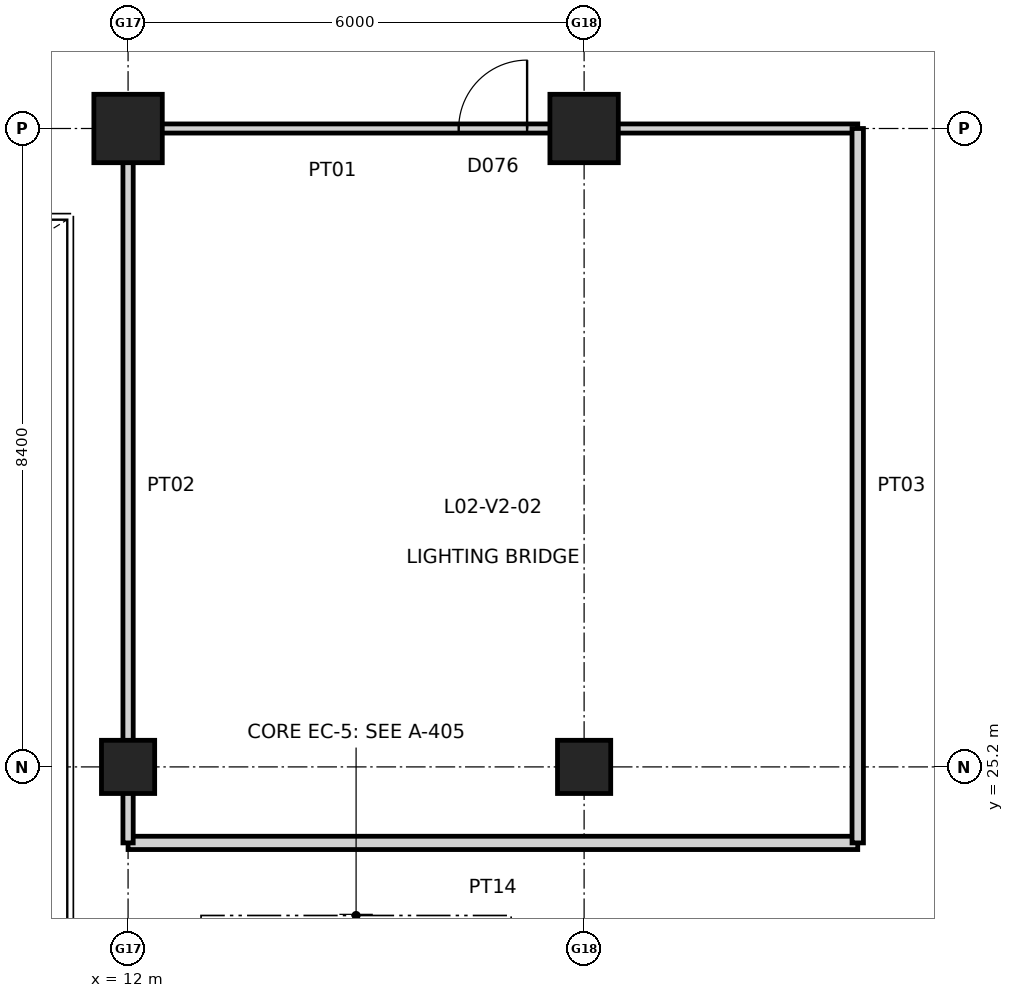
"""IFC4 building model, lengths in metres.
Left out: names, types, materials, properties, quantities, classifications, styles, units other than length and angle.
Written with IfcOpenShell. Run it as: python <this file> out.ifc"""

import sys

from ifc_helpers import new_model, si_unit, direction, frame, frame_2d, origin, origin_2d, place, context, subcontext, project, spatial, rectangle, extrude, element, fill, save


model = new_model("IFC4")
c1 = context("Model", 3, precision=1e-05, world=origin(), true_north=direction((0.0, 1.0)))
c2 = subcontext(c1, "Body", "Model", "MODEL_VIEW")
j1 = project(units=[si_unit("LENGTHUNIT", "METRE"), si_unit("PLANEANGLEUNIT", "RADIAN")], contexts=[c1])
p1 = place(None, origin())
s1 = spatial("IfcSite", under=j1, at=p1, CompositionType="ELEMENT")
p2 = place(p1, origin())
s2 = spatial("IfcBuilding", under=s1, at=p2, CompositionType="ELEMENT")
p3 = place(p2, frame((0.0, 0.0, 10.2)))
s3 = spatial("IfcBuildingStorey", under=s2, at=p3, CompositionType="ELEMENT", Elevation=10.2)
p4 = place(p3, frame((12.0, 25.2, 0.0), z_axis=(0.0, 0.0, 1.0), x_axis=(1.0, 0.0, 0.0)))
e1 = element("IfcColumn", 1, at=p4, inside=s3, PredefinedType="COLUMN", context=c2, shape_type="SweptSolid", body=[
    extrude(rectangle(XDim=0.7, YDim=0.7, at=origin_2d()), origin(), (0.0, 0.0, 1.0), 4.8),
])
p5 = place(p3, frame((12.0, 33.6, 0.0), z_axis=(0.0, 0.0, 1.0), x_axis=(1.0, 0.0, 0.0)))
e2 = element("IfcColumn", 2, at=p5, inside=s3, PredefinedType="COLUMN", context=c2, shape_type="SweptSolid", body=[
    extrude(rectangle(XDim=0.9, YDim=0.9, at=origin_2d()), origin(), (0.0, 0.0, 1.0), 4.8),
])
p6 = place(p3, frame((18.0, 25.2, 0.0), z_axis=(0.0, 0.0, 1.0), x_axis=(1.0, 0.0, 0.0)))
e3 = element("IfcColumn", 3, at=p6, inside=s3, PredefinedType="COLUMN", context=c2, shape_type="SweptSolid", body=[
    extrude(rectangle(XDim=0.7, YDim=0.7, at=origin_2d()), origin(), (0.0, 0.0, 1.0), 4.8),
])
p7 = place(p3, frame((18.0, 33.6, 0.0), z_axis=(0.0, 0.0, 1.0), x_axis=(1.0, 0.0, 0.0)))
e4 = element("IfcColumn", 4, at=p7, inside=s3, PredefinedType="COLUMN", context=c2, shape_type="SweptSolid", body=[
    extrude(rectangle(XDim=0.9, YDim=0.9, at=origin_2d()), origin(), (0.0, 0.0, 1.0), 4.8),
])
p8 = place(p3, frame((12.0, 24.2, 0.0), z_axis=(0.0, 0.0, 1.0), x_axis=(1.0, 0.0, 0.0)))
e5 = element("IfcWall", 5, at=p8, inside=s3, PredefinedType="PARTITIONING", context=c2, shape_type="SweptSolid", body=[
    extrude(rectangle(XDim=9.6, YDim=0.175, at=frame_2d((4.8, 0.0))), origin(), (0.0, 0.0, 1.0), 4.42),
])
p9 = place(p3, frame((12.0, 33.6, 0.0), z_axis=(0.0, 0.0, 1.0), x_axis=(1.0, 0.0, 0.0)))
e6 = element("IfcWall", 6, at=p9, inside=s3, PredefinedType="PARTITIONING", context=c2, shape_type="SweptSolid", body=[
    extrude(rectangle(XDim=9.6, YDim=0.12, at=frame_2d((4.8, 0.0))), origin(), (0.0, 0.0, 1.0), 3.812),
])
p10 = place(p9, frame((4.35, 0.0, 0.0)))
e7 = element("IfcOpeningElement", 7, at=p10, cuts=e6, PredefinedType="OPENING", context=c2, shape_type="SweptSolid", body=[
    extrude(rectangle(XDim=0.9, YDim=2.1, at=frame_2d((0.45, 1.05))), frame((0.0, 0.07, 0.0), z_axis=(0.0, -1.0, 0.0), x_axis=(1.0, 0.0, 0.0)), (0.0, 0.0, 1.0), 0.14),
])
p11 = place(p3, frame((12.0, 24.2, 0.0), z_axis=(0.0, 0.0, 1.0), x_axis=(0.0, 1.0, 0.0)))
e8 = element("IfcWall", 8, at=p11, inside=s3, PredefinedType="PARTITIONING", context=c2, shape_type="SweptSolid", body=[
    extrude(rectangle(XDim=9.4, YDim=0.135, at=frame_2d((4.7, 0.0))), origin(), (0.0, 0.0, 1.0), 3.734),
])
p12 = place(p3, frame((21.6, 24.2, 0.0), z_axis=(0.0, 0.0, 1.0), x_axis=(0.0, 1.0, 0.0)))
e9 = element("IfcWall", 9, at=p12, inside=s3, PredefinedType="PARTITIONING", context=c2, shape_type="SweptSolid", body=[
    extrude(rectangle(XDim=9.4, YDim=0.15, at=frame_2d((4.7, 0.0))), origin(), (0.0, 0.0, 1.0), 4.42),
])
p13 = place(p10, origin())
e10 = element("IfcDoor", 10, at=p13, inside=s3, OperationType="SINGLE_SWING_RIGHT", PredefinedType="DOOR", context=c2, shape_type="SweptSolid", body=[
    extrude(rectangle(XDim=0.9, YDim=2.1, at=frame_2d((0.45, 1.05))), frame((0.0, 0.025, 0.0), z_axis=(0.0, -1.0, 0.0), x_axis=(1.0, 0.0, 0.0)), (0.0, 0.0, 1.0), 0.05),
])
fill(e7, e10)
save(model, sys.argv[1])
